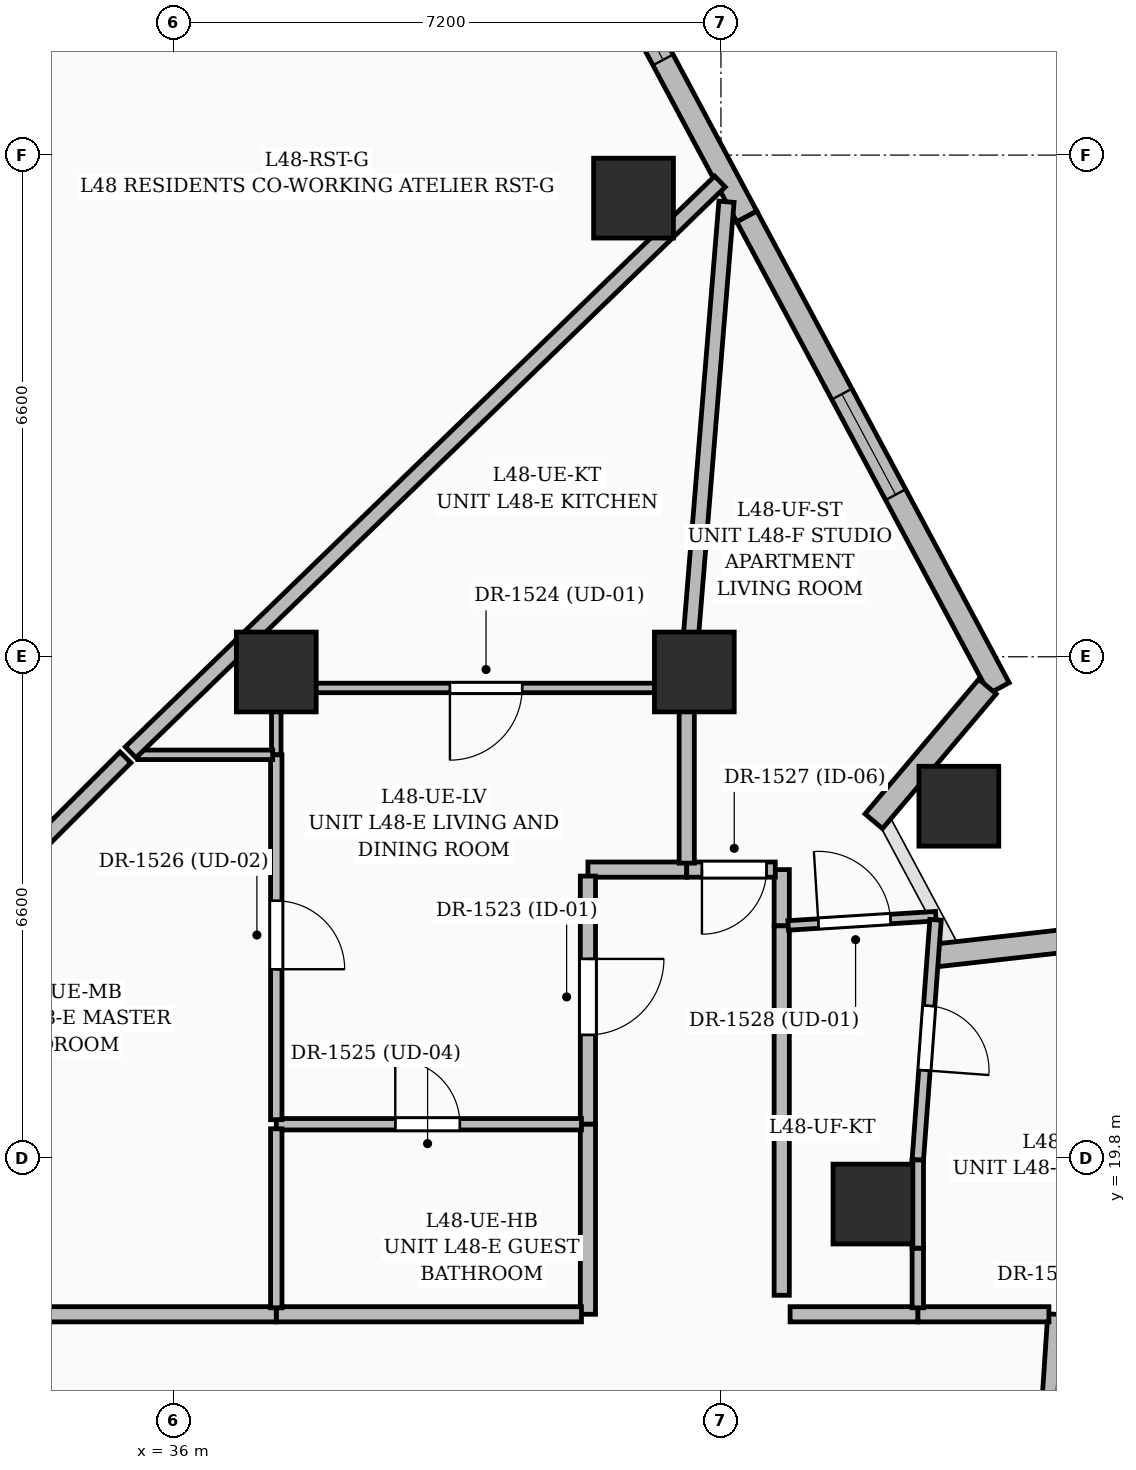
"""IFC4 building model, lengths in metres.
Left out: names, types, materials, properties, quantities, classifications, styles, units other than length and angle.
Written with IfcOpenShell. Run it as: python <this file> out.ifc"""

import sys

from ifc_helpers import new_model, si_unit, direction, frame, frame_2d, origin, origin_2d, place, context, subcontext, project, spatial, rectangle, extrude, element, fill, save


model = new_model("IFC4")
c1 = context("Model", 3, precision=1e-05, world=origin(), true_north=direction((0.0, 1.0)))
c2 = subcontext(c1, "Body", "Model", "MODEL_VIEW")
j1 = project(units=[si_unit("LENGTHUNIT", "METRE"), si_unit("PLANEANGLEUNIT", "RADIAN")], contexts=[c1])
p1 = place(None, origin())
s1 = spatial("IfcSite", under=j1, at=p1, CompositionType="ELEMENT")
p2 = place(p1, origin())
s2 = spatial("IfcBuilding", under=s1, at=p2, CompositionType="ELEMENT")
p3 = place(p2, frame((0.0, 0.0, 186.0)))
s3 = spatial("IfcBuildingStorey", under=s2, at=p3, CompositionType="ELEMENT", Elevation=186.0)
for number, where, z_axis, x_axis in (
    (1, (45.2, 19.2, 0.0), (0.0, 0.0, 1.0), (1.0, 0.0, 0.0)),
    (2, (42.85, 26.2, 0.0), (0.0, 0.0, 1.0), (1.0, 0.0, 0.0)),
    (3, (37.35, 26.2, 0.0), (0.0, 0.0, 1.0), (1.0, 0.0, 0.0)),
    (4, (46.33, 24.434, 0.0), (0.0, 0.0, 1.0), (1.0, 0.0, 0.0)),
    (5, (42.05, 32.434, 0.0), (0.0, 0.0, 1.0), (1.0, 0.0, 0.0)),
):
    element("IfcColumn", number, at=place(p3, frame(where, z_axis=z_axis, x_axis=x_axis)), inside=s3, PredefinedType="COLUMN", context=c2, shape_type="SweptSolid", body=[
        extrude(rectangle(XDim=1.05, YDim=1.05, at=origin_2d()), origin(), (0.0, 0.0, 1.0), 3.6),
    ])
p4 = place(p3, frame((32.451, 32.577, 0.0), z_axis=(0.0, 0.0, 1.0), x_axis=(0.542031523986, 0.840358154006, 0.0)))
e6 = element("IfcWall", 6, at=p4, inside=s3, PredefinedType="SOLIDWALL", context=c2, shape_type="SweptSolid", body=[
    extrude(rectangle(XDim=7.116, YDim=0.3, at=frame_2d((3.558, 0.0))), origin(), (0.0, 0.0, 1.0), 3.35),
])
p5 = place(p4, frame((2.275, 0.0, 0.6)))
e7 = element("IfcOpeningElement", 7, at=p5, cuts=e6, PredefinedType="OPENING", context=c2, shape_type="SweptSolid", body=[
    extrude(rectangle(XDim=1.5, YDim=2.1, at=frame_2d((0.75, 1.05))), frame((0.0, 0.16, 0.0), z_axis=(0.0, -1.0, 0.0), x_axis=(1.0, 0.0, 0.0)), (0.0, 0.0, 1.0), 0.32),
])
p6 = place(p3, frame((40.499, 37.876, 0.0), z_axis=(0.0, 0.0, 1.0), x_axis=(0.471749487015, -0.881732624723, 0.0)))
e8 = element("IfcWall", 8, at=p6, inside=s3, PredefinedType="SOLIDWALL", context=c2, shape_type="SweptSolid", body=[
    extrude(rectangle(XDim=6.447, YDim=0.3, at=frame_2d((3.223, 0.0))), origin(), (0.0, 0.0, 1.0), 3.35),
])
p7 = place(p6, frame((2.51, 0.0, 0.55)))
e9 = element("IfcOpeningElement", 9, at=p7, cuts=e8, PredefinedType="OPENING", context=c2, shape_type="SweptSolid", body=[
    extrude(rectangle(XDim=1.6, YDim=2.2, at=frame_2d((0.8, 1.1))), frame((0.0, 0.16, 0.0), z_axis=(0.0, -1.0, 0.0), x_axis=(1.0, 0.0, 0.0)), (0.0, 0.0, 1.0), 0.32),
])
p8 = place(p3, frame((43.541, 32.192, 0.0), z_axis=(0.0, 0.0, 1.0), x_axis=(0.471760157183, -0.881726915827, 0.0)))
e10 = element("IfcWall", 10, at=p8, inside=s3, PredefinedType="SOLIDWALL", context=c2, shape_type="SweptSolid", body=[
    extrude(rectangle(XDim=7.037, YDim=0.3, at=frame_2d((3.518, 0.0))), origin(), (0.0, 0.0, 1.0), 3.35),
])
p9 = place(p8, frame((2.65, 0.0, 0.6)))
e11 = element("IfcOpeningElement", 11, at=p9, cuts=e10, PredefinedType="OPENING", context=c2, shape_type="SweptSolid", body=[
    extrude(rectangle(XDim=1.5, YDim=2.1, at=frame_2d((0.75, 1.05))), frame((0.0, 0.16, 0.0), z_axis=(0.0, -1.0, 0.0), x_axis=(1.0, 0.0, 0.0)), (0.0, 0.0, 1.0), 0.32),
])
p10 = place(p3, frame((46.707, 26.008, 0.0), z_axis=(0.0, 0.0, 1.0), x_axis=(-0.645172623399, -0.76403683551, 0.0)))
e12 = element("IfcWall", 12, at=p10, inside=s3, PredefinedType="SOLIDWALL", context=c2, shape_type="SweptSolid", body=[
    extrude(rectangle(XDim=2.319, YDim=0.3, at=frame_2d((1.159, 0.0))), origin(), (0.0, 0.0, 1.0), 2.575),
])
p11 = place(p3, frame((46.041, 22.472, 0.0), z_axis=(0.0, 0.0, 1.0), x_axis=(0.993671441146, 0.112325718565, 0.0)))
e13 = element("IfcWall", 13, at=p11, inside=s3, PredefinedType="SOLIDWALL", context=c2, shape_type="SweptSolid", body=[
    extrude(rectangle(XDim=2.702, YDim=0.3, at=frame_2d((1.351, 0.0))), origin(), (0.0, 0.0, 1.0), 2.575),
])
p12 = place(p3, frame((42.75, 23.6, 0.0), z_axis=(0.0, 0.0, 1.0), x_axis=(-1.0, 0.0, 0.0)))
e14 = element("IfcWall", 14, at=p12, inside=s3, PredefinedType="PARTITIONING", context=c2, shape_type="SweptSolid", body=[
    extrude(rectangle(XDim=1.3, YDim=0.2, at=frame_2d((0.65, 0.0))), origin(), (0.0, 0.0, 1.0), 3.35),
])
p13 = place(p3, frame((41.45, 23.515, 0.0), z_axis=(0.0, 0.0, 1.0), x_axis=(0.0, -1.0, 0.0)))
e15 = element("IfcWall", 15, at=p13, inside=s3, PredefinedType="PARTITIONING", context=c2, shape_type="SweptSolid", body=[
    extrude(rectangle(XDim=3.265, YDim=0.2, at=frame_2d((1.632, 0.0))), origin(), (0.0, 0.0, 1.0), 3.35),
])
p14 = place(p13, frame((1.09, 0.0, 0.0)))
e16 = element("IfcOpeningElement", 16, at=p14, cuts=e15, PredefinedType="OPENING", context=c2, shape_type="SweptSolid", body=[
    extrude(rectangle(XDim=1.0, YDim=2.2, at=frame_2d((0.5, 1.1))), frame((0.0, 0.11, 0.0), z_axis=(0.0, -1.0, 0.0), x_axis=(1.0, 0.0, 0.0)), (0.0, 0.0, 1.0), 0.22),
])
p15 = place(p3, frame((41.45, 20.25, 0.0), z_axis=(0.0, 0.0, 1.0), x_axis=(0.0, -1.0, 0.0)))
e17 = element("IfcWall", 17, at=p15, inside=s3, PredefinedType="PARTITIONING", context=c2, shape_type="SweptSolid", body=[
    extrude(rectangle(XDim=2.5, YDim=0.2, at=frame_2d((1.25, 0.0))), origin(), (0.0, 0.0, 1.0), 3.35),
])
p16 = place(p3, frame((41.365, 17.75, 0.0), z_axis=(0.0, 0.0, 1.0), x_axis=(-1.0, 0.0, 0.0)))
e18 = element("IfcWall", 18, at=p16, inside=s3, PredefinedType="PARTITIONING", context=c2, shape_type="SweptSolid", body=[
    extrude(rectangle(XDim=4.015, YDim=0.2, at=frame_2d((2.007, 0.0))), origin(), (0.0, 0.0, 1.0), 3.35),
])
p17 = place(p3, frame((37.35, 17.75, 0.0), z_axis=(0.0, 0.0, 1.0), x_axis=(-1.0, 0.0, 0.0)))
e19 = element("IfcWall", 19, at=p17, inside=s3, PredefinedType="PARTITIONING", context=c2, shape_type="SweptSolid", body=[
    extrude(rectangle(XDim=5.4, YDim=0.2, at=frame_2d((2.7, 0.0))), origin(), (0.0, 0.0, 1.0), 2.436),
])
p18 = place(p3, frame((44.0, 22.86, 0.0), z_axis=(0.0, 0.0, 1.0), x_axis=(0.0, 1.0, 0.0)))
e20 = element("IfcWall", 20, at=p18, inside=s3, PredefinedType="PARTITIONING", context=c2, shape_type="SweptSolid", body=[
    extrude(rectangle(XDim=0.74, YDim=0.2, at=frame_2d((0.37, 0.0))), origin(), (0.0, 0.0, 1.0), 2.436),
])
p19 = place(p3, frame((43.915, 23.6, 0.0), z_axis=(0.0, 0.0, 1.0), x_axis=(-1.0, 0.0, 0.0)))
e21 = element("IfcWall", 21, at=p19, inside=s3, PredefinedType="PARTITIONING", context=c2, shape_type="SweptSolid", body=[
    extrude(rectangle(XDim=1.165, YDim=0.2, at=frame_2d((0.583, 0.0))), origin(), (0.0, 0.0, 1.0), 2.436),
])
p20 = place(p19, frame((0.115, 0.0, 0.0)))
e22 = element("IfcOpeningElement", 22, at=p20, cuts=e21, PredefinedType="OPENING", context=c2, shape_type="SweptSolid", body=[
    extrude(rectangle(XDim=0.85, YDim=2.1, at=frame_2d((0.425, 1.05))), frame((0.0, 0.11, 0.0), z_axis=(0.0, -1.0, 0.0), x_axis=(1.0, 0.0, 0.0)), (0.0, 0.0, 1.0), 0.22),
])
p21 = place(p3, frame((47.437, 15.305, 0.0), z_axis=(0.0, 0.0, 1.0), x_axis=(0.066545458009, 0.997783394339, 0.0)))
e23 = element("IfcWall", 23, at=p21, inside=s3, PredefinedType="PARTITIONING", context=c2, shape_type="SweptSolid", body=[
    extrude(rectangle(XDim=2.451, YDim=0.2, at=frame_2d((1.225, 0.0))), origin(), (0.0, 0.0, 1.0), 2.464),
])
p22 = place(p3, frame((47.515, 17.75, 0.0), z_axis=(0.0, 0.0, 1.0), x_axis=(-1.0, 0.0, 0.0)))
e24 = element("IfcWall", 24, at=p22, inside=s3, PredefinedType="PARTITIONING", context=c2, shape_type="SweptSolid", body=[
    extrude(rectangle(XDim=1.725, YDim=0.2, at=frame_2d((0.862, 0.0))), origin(), (0.0, 0.0, 1.0), 2.436),
])
p23 = place(p3, frame((44.0, 18.0, 0.0), z_axis=(0.0, 0.0, 1.0), x_axis=(0.0, 1.0, 0.0)))
e25 = element("IfcWall", 25, at=p23, inside=s3, PredefinedType="PARTITIONING", context=c2, shape_type="SweptSolid", body=[
    extrude(rectangle(XDim=4.86, YDim=0.2, at=frame_2d((2.43, 0.0))), origin(), (0.0, 0.0, 1.0), 2.436),
])
p24 = place(p3, frame((45.79, 17.75, 0.0), z_axis=(0.0, 0.0, 1.0), x_axis=(-1.0, 0.0, 0.0)))
e26 = element("IfcWall", 26, at=p24, inside=s3, PredefinedType="PARTITIONING", context=c2, shape_type="SweptSolid", body=[
    extrude(rectangle(XDim=1.68, YDim=0.2, at=frame_2d((0.84, 0.0))), origin(), (0.0, 0.0, 1.0), 2.436),
])
p25 = place(p3, frame((50.774, 18.47, 0.0), z_axis=(0.0, 0.0, 1.0), x_axis=(-0.70755309569, -0.706660184798, 0.0)))
e27 = element("IfcWall", 27, at=p25, inside=s3, PredefinedType="PARTITIONING", context=c2, shape_type="SweptSolid", body=[
    extrude(rectangle(XDim=4.648, YDim=0.2, at=frame_2d((2.324, 0.0))), origin(), (0.0, 0.0, 1.0), 2.464),
])
p26 = place(p25, frame((1.813, 0.0, 0.0)))
e28 = element("IfcOpeningElement", 28, at=p26, cuts=e27, PredefinedType="OPENING", context=c2, shape_type="SweptSolid", body=[
    extrude(rectangle(XDim=1.6, YDim=2.3, at=frame_2d((0.8, 1.15))), frame((0.0, 0.11, 0.0), z_axis=(0.0, -1.0, 0.0), x_axis=(1.0, 0.0, 0.0)), (0.0, 0.0, 1.0), 0.22),
])
p27 = place(p3, frame((37.35, 20.25, 0.0), z_axis=(0.0, 0.0, 1.0), x_axis=(1.0, 0.0, 0.0)))
e29 = element("IfcWall", 29, at=p27, inside=s3, PredefinedType="PARTITIONING", context=c2, shape_type="SweptSolid", body=[
    extrude(rectangle(XDim=4.015, YDim=0.15, at=frame_2d((2.007, 0.0))), origin(), (0.0, 0.0, 1.0), 3.35),
])
p28 = place(p27, frame((1.566, 0.0, 0.0)))
e30 = element("IfcOpeningElement", 30, at=p28, cuts=e29, PredefinedType="OPENING", context=c2, shape_type="SweptSolid", body=[
    extrude(rectangle(XDim=0.85, YDim=2.1, at=frame_2d((0.425, 1.05))), frame((0.0, 0.085, 0.0), z_axis=(0.0, -1.0, 0.0), x_axis=(1.0, 0.0, 0.0)), (0.0, 0.0, 1.0), 0.17),
])
p29 = place(p3, frame((42.75, 25.99, 0.0), z_axis=(0.0, 0.0, 1.0), x_axis=(-1.0, 0.0, 0.0)))
e31 = element("IfcWall", 31, at=p29, inside=s3, PredefinedType="PARTITIONING", context=c2, shape_type="SweptSolid", body=[
    extrude(rectangle(XDim=5.4, YDim=0.125, at=frame_2d((2.7, 0.0))), origin(), (0.0, 0.0, 1.0), 2.436),
])
p30 = place(p29, frame((2.165, 0.0, 0.0)))
e32 = element("IfcOpeningElement", 32, at=p30, cuts=e31, PredefinedType="OPENING", context=c2, shape_type="SweptSolid", body=[
    extrude(rectangle(XDim=0.95, YDim=2.2, at=frame_2d((0.475, 1.1))), frame((0.0, 0.072, 0.0), z_axis=(0.0, -1.0, 0.0), x_axis=(1.0, 0.0, 0.0)), (0.0, 0.0, 1.0), 0.145),
])
p31 = place(p3, frame((37.35, 25.942, 0.0), z_axis=(0.0, 0.0, 1.0), x_axis=(0.0, -1.0, 0.0)))
e33 = element("IfcWall", 33, at=p31, inside=s3, PredefinedType="PARTITIONING", context=c2, shape_type="SweptSolid", body=[
    extrude(rectangle(XDim=0.832, YDim=0.125, at=frame_2d((0.416, 0.0))), origin(), (0.0, 0.0, 1.0), 3.35),
])
p32 = place(p3, frame((37.35, 25.11, 0.0), z_axis=(0.0, 0.0, 1.0), x_axis=(0.0, -1.0, 0.0)))
e34 = element("IfcWall", 34, at=p32, inside=s3, PredefinedType="PARTITIONING", context=c2, shape_type="SweptSolid", body=[
    extrude(rectangle(XDim=4.8, YDim=0.15, at=frame_2d((2.4, 0.0))), origin(), (0.0, 0.0, 1.0), 3.35),
])
p33 = place(p32, frame((1.921, 0.0, 0.0)))
e35 = element("IfcOpeningElement", 35, at=p33, cuts=e34, PredefinedType="OPENING", context=c2, shape_type="SweptSolid", body=[
    extrude(rectangle(XDim=0.9, YDim=2.15, at=frame_2d((0.45, 1.075))), frame((0.0, 0.085, 0.0), z_axis=(0.0, -1.0, 0.0), x_axis=(1.0, 0.0, 0.0)), (0.0, 0.0, 1.0), 0.17),
])
p34 = place(p3, frame((42.75, 23.685, 0.0), z_axis=(0.0, 0.0, 1.0), x_axis=(0.0, 1.0, 0.0)))
e36 = element("IfcWall", 36, at=p34, inside=s3, PredefinedType="PARTITIONING", context=c2, shape_type="SweptSolid", body=[
    extrude(rectangle(XDim=2.257, YDim=0.2, at=frame_2d((1.129, 0.0))), origin(), (0.0, 0.0, 1.0), 3.35),
])
p35 = place(p3, frame((37.35, 20.19, 0.0), z_axis=(0.0, 0.0, 1.0), x_axis=(0.0, -1.0, 0.0)))
e37 = element("IfcWall", 37, at=p35, inside=s3, PredefinedType="PARTITIONING", context=c2, shape_type="SweptSolid", body=[
    extrude(rectangle(XDim=2.355, YDim=0.15, at=frame_2d((1.177, 0.0))), origin(), (0.0, 0.0, 1.0), 3.35),
])
p36 = place(p3, frame((35.53, 25.11, 0.0), z_axis=(0.0, 0.0, 1.0), x_axis=(1.0, 0.0, 0.0)))
e38 = element("IfcWall", 38, at=p36, inside=s3, PredefinedType="PARTITIONING", context=c2, shape_type="SweptSolid", body=[
    extrude(rectangle(XDim=1.772, YDim=0.125, at=frame_2d((0.886, 0.0))), origin(), (0.0, 0.0, 1.0), 2.436),
])
p37 = place(p3, frame((42.753, 26.037, 0.0), z_axis=(0.0, 0.0, 1.0), x_axis=(0.081560923922, 0.996668357925, 0.0)))
e39 = element("IfcWall", 39, at=p37, inside=s3, PredefinedType="PARTITIONING", context=c2, shape_type="SweptSolid", body=[
    extrude(rectangle(XDim=6.37, YDim=0.2, at=frame_2d((3.185, 0.0))), origin(), (0.0, 0.0, 1.0), 2.464),
])
p38 = place(p3, frame((43.187, 32.652, 0.0), z_axis=(0.0, 0.0, 1.0), x_axis=(-0.718315109046, -0.695717905559, 0.0)))
e40 = element("IfcWall", 40, at=p38, inside=s3, PredefinedType="PARTITIONING", context=c2, shape_type="SweptSolid", body=[
    extrude(rectangle(XDim=10.793, YDim=0.2, at=frame_2d((5.396, 0.0))), origin(), (0.0, 0.0, 1.0), 2.464),
])
p39 = place(p3, frame((35.366, 25.076, 0.0), z_axis=(0.0, 0.0, 1.0), x_axis=(-0.707132498369, -0.707081063069, 0.0)))
e41 = element("IfcWall", 41, at=p39, inside=s3, PredefinedType="PARTITIONING", context=c2, shape_type="SweptSolid", body=[
    extrude(rectangle(XDim=4.747, YDim=0.2, at=frame_2d((2.373, 0.0))), origin(), (0.0, 0.0, 1.0), 2.709),
])
p40 = place(p3, frame((44.085, 22.865, 0.0), z_axis=(0.0, 0.0, 1.0), x_axis=(0.998038887388, 0.062596958875, 0.0)))
e42 = element("IfcWall", 42, at=p40, inside=s3, PredefinedType="PARTITIONING", context=c2, shape_type="SweptSolid", body=[
    extrude(rectangle(XDim=1.946, YDim=0.125, at=frame_2d((0.973, 0.0))), origin(), (0.0, 0.0, 1.0), 2.436),
])
p41 = place(p40, frame((0.398, 0.0, 0.0)))
e43 = element("IfcOpeningElement", 43, at=p41, cuts=e42, PredefinedType="OPENING", context=c2, shape_type="SweptSolid", body=[
    extrude(rectangle(XDim=0.95, YDim=2.2, at=frame_2d((0.475, 1.1))), frame((0.0, 0.072, 0.0), z_axis=(0.0, -1.0, 0.0), x_axis=(1.0, 0.0, 0.0)), (0.0, 0.0, 1.0), 0.145),
])
p42 = place(p3, frame((45.79, 18.62, 0.0), z_axis=(0.0, 0.0, 1.0), x_axis=(0.0, -1.0, 0.0)))
e44 = element("IfcWall", 44, at=p42, inside=s3, PredefinedType="PARTITIONING", context=c2, shape_type="SweptSolid", body=[
    extrude(rectangle(XDim=0.785, YDim=0.15, at=frame_2d((0.393, 0.0))), origin(), (0.0, 0.0, 1.0), 2.436),
])
p43 = place(p3, frame((46.023, 22.94, 0.0), z_axis=(0.0, 0.0, 1.0), x_axis=(-0.073667317679, -0.99728287176, 0.0)))
e45 = element("IfcWall", 45, at=p43, inside=s3, PredefinedType="PARTITIONING", context=c2, shape_type="SweptSolid", body=[
    extrude(rectangle(XDim=3.168, YDim=0.15, at=frame_2d((1.584, 0.0))), origin(), (0.0, 0.0, 1.0), 2.464),
])
p44 = place(p43, frame((1.135, 0.0, 0.0)))
e46 = element("IfcOpeningElement", 46, at=p44, cuts=e45, PredefinedType="OPENING", context=c2, shape_type="SweptSolid", body=[
    extrude(rectangle(XDim=0.85, YDim=2.1, at=frame_2d((0.425, 1.05))), frame((0.0, 0.085, 0.0), z_axis=(0.0, -1.0, 0.0), x_axis=(1.0, 0.0, 0.0)), (0.0, 0.0, 1.0), 0.17),
])
p45 = place(p3, frame((45.79, 19.78, 0.0), z_axis=(0.0, 0.0, 1.0), x_axis=(0.0, -1.0, 0.0)))
e47 = element("IfcWall", 47, at=p45, inside=s3, PredefinedType="PARTITIONING", context=c2, shape_type="SweptSolid", body=[
    extrude(rectangle(XDim=1.16, YDim=0.15, at=frame_2d((0.58, 0.0))), origin(), (0.0, 0.0, 1.0), 2.709),
])
p46 = place(p7, origin())
e48 = element("IfcWindow", 48, at=p46, inside=s3, PartitioningType="SINGLE_PANEL", PredefinedType="WINDOW", context=c2, shape_type="SweptSolid", body=[
    extrude(rectangle(XDim=1.6, YDim=2.2, at=frame_2d((0.8, 1.1))), frame((0.0, 0.03, 0.0), z_axis=(0.0, -1.0, 0.0), x_axis=(1.0, 0.0, 0.0)), (0.0, 0.0, 1.0), 0.06),
])
fill(e9, e48)
p47 = place(p9, origin())
e49 = element("IfcWindow", 49, at=p47, inside=s3, PartitioningType="SINGLE_PANEL", PredefinedType="WINDOW", context=c2, shape_type="SweptSolid", body=[
    extrude(rectangle(XDim=1.5, YDim=2.1, at=frame_2d((0.75, 1.05))), frame((0.0, 0.03, 0.0), z_axis=(0.0, -1.0, 0.0), x_axis=(1.0, 0.0, 0.0)), (0.0, 0.0, 1.0), 0.06),
])
fill(e11, e49)
p48 = place(p14, origin())
e50 = element("IfcDoor", 50, at=p48, inside=s3, OperationType="SINGLE_SWING_LEFT", PredefinedType="DOOR", context=c2, shape_type="SweptSolid", body=[
    extrude(rectangle(XDim=1.0, YDim=2.2, at=frame_2d((0.5, 1.1))), frame((0.0, 0.025, 0.0), z_axis=(0.0, -1.0, 0.0), x_axis=(1.0, 0.0, 0.0)), (0.0, 0.0, 1.0), 0.05),
])
fill(e16, e50)
p49 = place(p30, origin())
e51 = element("IfcDoor", 51, at=p49, inside=s3, OperationType="SINGLE_SWING_RIGHT", PredefinedType="DOOR", context=c2, shape_type="SweptSolid", body=[
    extrude(rectangle(XDim=0.95, YDim=2.2, at=frame_2d((0.475, 1.1))), frame((0.0, 0.025, 0.0), z_axis=(0.0, -1.0, 0.0), x_axis=(1.0, 0.0, 0.0)), (0.0, 0.0, 1.0), 0.05),
])
fill(e32, e51)
p50 = place(p28, origin())
e52 = element("IfcDoor", 52, at=p50, inside=s3, OperationType="SINGLE_SWING_LEFT", PredefinedType="DOOR", context=c2, shape_type="SweptSolid", body=[
    extrude(rectangle(XDim=0.85, YDim=2.1, at=frame_2d((0.425, 1.05))), frame((0.0, 0.025, 0.0), z_axis=(0.0, -1.0, 0.0), x_axis=(1.0, 0.0, 0.0)), (0.0, 0.0, 1.0), 0.05),
])
fill(e30, e52)
p51 = place(p33, origin())
e53 = element("IfcDoor", 53, at=p51, inside=s3, OperationType="SINGLE_SWING_RIGHT", PredefinedType="DOOR", context=c2, shape_type="SweptSolid", body=[
    extrude(rectangle(XDim=0.9, YDim=2.15, at=frame_2d((0.45, 1.075))), frame((0.0, 0.025, 0.0), z_axis=(0.0, -1.0, 0.0), x_axis=(1.0, 0.0, 0.0)), (0.0, 0.0, 1.0), 0.05),
])
fill(e35, e53)
p52 = place(p20, origin())
e54 = element("IfcDoor", 54, at=p52, inside=s3, OperationType="SINGLE_SWING_RIGHT", PredefinedType="DOOR", context=c2, shape_type="SweptSolid", body=[
    extrude(rectangle(XDim=0.85, YDim=2.1, at=frame_2d((0.425, 1.05))), frame((0.0, 0.025, 0.0), z_axis=(0.0, -1.0, 0.0), x_axis=(1.0, 0.0, 0.0)), (0.0, 0.0, 1.0), 0.05),
])
fill(e22, e54)
p53 = place(p41, origin())
e55 = element("IfcDoor", 55, at=p53, inside=s3, OperationType="SINGLE_SWING_LEFT", PredefinedType="DOOR", context=c2, shape_type="SweptSolid", body=[
    extrude(rectangle(XDim=0.95, YDim=2.2, at=frame_2d((0.475, 1.1))), frame((0.0, 0.025, 0.0), z_axis=(0.0, -1.0, 0.0), x_axis=(1.0, 0.0, 0.0)), (0.0, 0.0, 1.0), 0.05),
])
fill(e43, e55)
p54 = place(p44, origin())
e56 = element("IfcDoor", 56, at=p54, inside=s3, OperationType="SINGLE_SWING_RIGHT", PredefinedType="DOOR", context=c2, shape_type="SweptSolid", body=[
    extrude(rectangle(XDim=0.85, YDim=2.1, at=frame_2d((0.425, 1.05))), frame((0.0, 0.025, 0.0), z_axis=(0.0, -1.0, 0.0), x_axis=(1.0, 0.0, 0.0)), (0.0, 0.0, 1.0), 0.05),
])
fill(e46, e56)
save(model, sys.argv[1])
